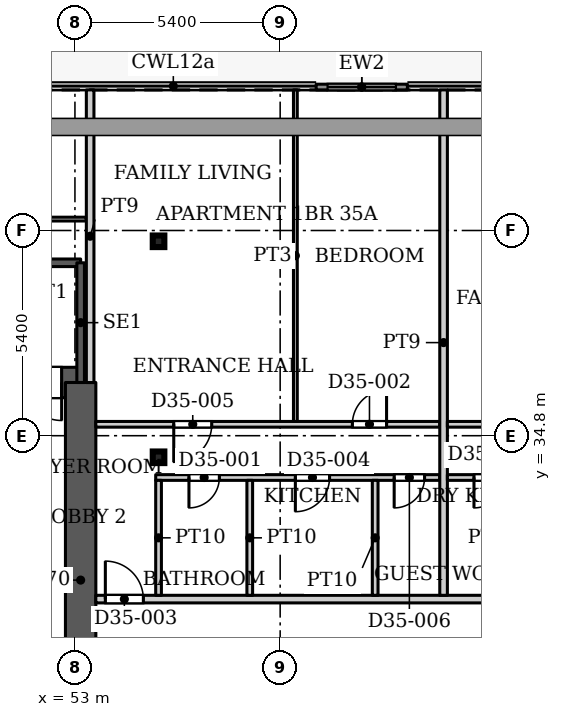
"""IFC4 building model, lengths in metres.
Left out: names, types, materials, properties, quantities, classifications, styles, units other than length and angle.
Written with IfcOpenShell. Run it as: python <this file> out.ifc"""

import sys

from ifc_helpers import new_model, si_unit, direction, frame, frame_2d, origin, origin_2d, place, context, subcontext, project, spatial, rectangle, hollow_rectangle, extrude, source, transform, mapped, element, fill, save


model = new_model("IFC4")
c1 = context("Model", 3, precision=1e-05, world=origin(), true_north=direction((0.0, 1.0)))
c2 = subcontext(c1, "Body", "Model", "MODEL_VIEW")
j1 = project(units=[si_unit("LENGTHUNIT", "METRE"), si_unit("PLANEANGLEUNIT", "RADIAN")], contexts=[c1])
p1 = place(None, origin())
s1 = spatial("IfcSite", under=j1, at=p1, CompositionType="ELEMENT")
p2 = place(p1, origin())
s2 = spatial("IfcBuilding", under=s1, at=p2, CompositionType="ELEMENT")
p3 = place(p2, frame((0.0, 0.0, 152.6)))
s3 = spatial("IfcBuildingStorey", under=s2, at=p3, CompositionType="ELEMENT", Elevation=152.6)
for number, where, z_axis, x_axis in (
    (1, (55.2, 34.232, 0.0), (0.0, 0.0, 1.0), (1.0, 0.0, 0.0)),
    (2, (55.2, 39.916, 0.0), (0.0, 0.0, 1.0), (1.0, 0.0, 0.0)),
):
    element("IfcColumn", number, at=place(p3, frame(where, z_axis=z_axis, x_axis=x_axis)), inside=s3, PredefinedType="COLUMN", context=c2, shape_type="SweptSolid", body=[
        extrude(hollow_rectangle(XDim=0.305, YDim=0.305, WallThickness=0.016, InnerFilletRadius=0.016, OuterFilletRadius=0.032, at=origin_2d()), origin(), (0.0, 0.0, 1.0), 3.9),
    ])
p4 = place(p3, frame((34.75, 36.2, 0.0), z_axis=(0.0, 0.0, 1.0), x_axis=(1.0, 0.0, 0.0)))
e3 = element("IfcWall", 3, at=p4, inside=s3, PredefinedType="SHEAR", context=c2, shape_type="SweptSolid", body=[
    extrude(rectangle(XDim=18.4, YDim=0.8, at=frame_2d((9.2, 0.0))), origin(), (0.0, 0.0, 1.0), 3.9),
])
p5 = place(p4, frame((16.9, 0.0, 0.0)))
e4 = element("IfcOpeningElement", 4, at=p5, cuts=e3, PredefinedType="OPENING", context=c2, shape_type="SweptSolid", body=[
    extrude(rectangle(XDim=1.0, YDim=2.2, at=frame_2d((0.5, 1.1))), frame((0.0, 0.41, 0.0), z_axis=(0.0, -1.0, 0.0), x_axis=(1.0, 0.0, 0.0)), (0.0, 0.0, 1.0), 0.82),
])
p6 = place(p3, frame((53.15, 25.8, 0.0), z_axis=(0.0, 0.0, 1.0), x_axis=(0.0, 1.0, 0.0)))
e5 = element("IfcWall", 5, at=p6, inside=s3, PredefinedType="SHEAR", context=c2, shape_type="SweptSolid", body=[
    extrude(rectangle(XDim=10.4, YDim=0.8, at=frame_2d((5.2, 0.0))), origin(), (0.0, 0.0, 1.0), 3.9),
])
p7 = place(p3, frame((59.347, 43.975, 0.0), z_axis=(0.0, 0.0, 1.0), x_axis=(1.0, 0.0, 0.0)))
e6 = element("IfcWall", 6, at=p7, inside=s3, PredefinedType="SOLIDWALL", context=c2, shape_type="SweptSolid", body=[
    extrude(rectangle(XDim=2.401, YDim=0.15, at=frame_2d((1.201, 0.0))), origin(), (0.0, 0.0, 1.0), 3.75),
])
p8 = place(p7, frame((0.3, 0.0, 0.0)))
e7 = element("IfcOpeningElement", 7, at=p8, cuts=e6, PredefinedType="OPENING", context=c2, shape_type="SweptSolid", body=[
    extrude(rectangle(XDim=1.8, YDim=2.4, at=frame_2d((0.9, 1.2))), frame((0.0, 0.085, 0.0), z_axis=(0.0, -1.0, 0.0), x_axis=(1.0, 0.0, 0.0)), (0.0, 0.0, 1.0), 0.17),
])
p9 = place(p3, frame((43.99, 39.35, 0.0), z_axis=(0.0, 0.0, 1.0), x_axis=(1.0, 0.0, 0.0)))
e8 = element("IfcWall", 8, at=p9, inside=s3, PredefinedType="SHEAR", context=c2, shape_type="SweptSolid", body=[
    extrude(rectangle(XDim=9.16, YDim=0.2, at=frame_2d((4.58, 0.0))), origin(), (0.0, 0.0, 1.0), 3.9),
])
p10 = place(p3, frame((53.15, 36.2, 0.0), z_axis=(0.0, 0.0, 1.0), x_axis=(0.0, 1.0, 0.0)))
e9 = element("IfcWall", 9, at=p10, inside=s3, PredefinedType="SHEAR", context=c2, shape_type="SweptSolid", body=[
    extrude(rectangle(XDim=3.15, YDim=0.2, at=frame_2d((1.575, 0.0))), origin(), (0.0, 0.0, 1.0), 3.9),
])
p11 = place(p3, frame((38.399, 40.5, 0.0), z_axis=(0.0, 0.0, 1.0), x_axis=(1.0, 0.0, 0.0)))
e10 = element("IfcWall", 10, at=p11, inside=s3, PredefinedType="PARTITIONING", context=c2, shape_type="SweptSolid", body=[
    extrude(rectangle(XDim=14.901, YDim=0.1, at=frame_2d((7.451, 0.0))), origin(), (0.0, 0.0, 1.0), 3.6),
])
p12 = place(p11, frame((6.801, 0.0, 0.0)))
e11 = element("IfcOpeningElement", 11, at=p12, cuts=e10, PredefinedType="OPENING", context=c2, shape_type="SweptSolid", body=[
    extrude(rectangle(XDim=1.0, YDim=2.1, at=frame_2d((0.5, 1.05))), frame((0.0, 0.06, 0.0), z_axis=(0.0, -1.0, 0.0), x_axis=(1.0, 0.0, 0.0)), (0.0, 0.0, 1.0), 0.12),
])
p13 = place(p3, frame((53.4, 36.199, 0.0), z_axis=(0.0, 0.0, 1.0), x_axis=(0.0, 1.0, 0.0)))
e12 = element("IfcWall", 12, at=p13, inside=s3, PredefinedType="PARTITIONING", context=c2, shape_type="SweptSolid", body=[
    extrude(rectangle(XDim=7.701, YDim=0.2, at=frame_2d((3.851, 0.0))), origin(), (0.0, 0.0, 1.0), 3.6),
])
p14 = place(p3, frame((53.549, 30.5, 0.0), z_axis=(0.0, 0.0, 1.0), x_axis=(1.0, 0.0, 0.0)))
e13 = element("IfcWall", 13, at=p14, inside=s3, PredefinedType="PARTITIONING", context=c2, shape_type="SweptSolid", body=[
    extrude(rectangle(XDim=35.551, YDim=0.2, at=frame_2d((17.775, 0.0))), origin(), (0.0, 0.0, 1.0), 3.6),
])
p15 = place(p14, frame((0.251, 0.0, 0.0)))
e14 = element("IfcOpeningElement", 14, at=p15, cuts=e13, PredefinedType="OPENING", context=c2, shape_type="SweptSolid", body=[
    extrude(rectangle(XDim=1.0, YDim=2.1, at=frame_2d((0.5, 1.05))), frame((0.0, 0.11, 0.0), z_axis=(0.0, -1.0, 0.0), x_axis=(1.0, 0.0, 0.0)), (0.0, 0.0, 1.0), 0.22),
])
p16 = place(p14, frame((21.701, 0.0, 0.0)))
e15 = element("IfcOpeningElement", 15, at=p16, cuts=e13, PredefinedType="OPENING", context=c2, shape_type="SweptSolid", body=[
    extrude(rectangle(XDim=1.0, YDim=2.1, at=frame_2d((0.5, 1.05))), frame((0.0, 0.11, 0.0), z_axis=(0.0, -1.0, 0.0), x_axis=(1.0, 0.0, 0.0)), (0.0, 0.0, 1.0), 0.22),
])
p17 = place(p14, frame((32.201, 0.0, 0.0)))
e16 = element("IfcOpeningElement", 16, at=p17, cuts=e13, PredefinedType="OPENING", context=c2, shape_type="SweptSolid", body=[
    extrude(rectangle(XDim=1.0, YDim=2.1, at=frame_2d((0.5, 1.05))), frame((0.0, 0.11, 0.0), z_axis=(0.0, -1.0, 0.0), x_axis=(1.0, 0.0, 0.0)), (0.0, 0.0, 1.0), 0.22),
])
p18 = place(p3, frame((53.549, 35.1, 0.0), z_axis=(0.0, 0.0, 1.0), x_axis=(1.0, 0.0, 0.0)))
e17 = element("IfcWall", 17, at=p18, inside=s3, PredefinedType="PARTITIONING", context=c2, shape_type="SweptSolid", body=[
    extrude(rectangle(XDim=9.051, YDim=0.15, at=frame_2d((4.525, 0.0))), origin(), (0.0, 0.0, 1.0), 3.6),
])
p19 = place(p18, frame((6.751, 0.0, 0.0)))
e18 = element("IfcOpeningElement", 18, at=p19, cuts=e17, PredefinedType="OPENING", context=c2, shape_type="SweptSolid", body=[
    extrude(rectangle(XDim=0.9, YDim=2.1, at=frame_2d((0.45, 1.05))), frame((0.0, 0.085, 0.0), z_axis=(0.0, -1.0, 0.0), x_axis=(1.0, 0.0, 0.0)), (0.0, 0.0, 1.0), 0.17),
])
p20 = place(p18, frame((2.051, 0.0, 0.0)))
e19 = element("IfcOpeningElement", 19, at=p20, cuts=e17, PredefinedType="OPENING", context=c2, shape_type="SweptSolid", body=[
    extrude(rectangle(XDim=1.0, YDim=2.1, at=frame_2d((0.5, 1.05))), frame((0.0, 0.085, 0.0), z_axis=(0.0, -1.0, 0.0), x_axis=(1.0, 0.0, 0.0)), (0.0, 0.0, 1.0), 0.17),
])
p21 = place(p3, frame((55.125, 33.7, 0.0), z_axis=(0.0, 0.0, 1.0), x_axis=(1.0, 0.0, 0.0)))
e20 = element("IfcWall", 20, at=p21, inside=s3, PredefinedType="PARTITIONING", context=c2, shape_type="SweptSolid", body=[
    extrude(rectangle(XDim=7.475, YDim=0.15, at=frame_2d((3.738, 0.0))), origin(), (0.0, 0.0, 1.0), 3.6),
])
p22 = place(p21, frame((0.875, 0.0, 0.0)))
e21 = element("IfcOpeningElement", 21, at=p22, cuts=e20, PredefinedType="OPENING", context=c2, shape_type="SweptSolid", body=[
    extrude(rectangle(XDim=0.8, YDim=2.1, at=frame_2d((0.4, 1.05))), frame((0.0, 0.085, 0.0), z_axis=(0.0, -1.0, 0.0), x_axis=(1.0, 0.0, 0.0)), (0.0, 0.0, 1.0), 0.17),
])
p23 = place(p21, frame((3.675, 0.0, 0.0)))
e22 = element("IfcOpeningElement", 22, at=p23, cuts=e20, PredefinedType="OPENING", context=c2, shape_type="SweptSolid", body=[
    extrude(rectangle(XDim=0.9, YDim=2.1, at=frame_2d((0.45, 1.05))), frame((0.0, 0.085, 0.0), z_axis=(0.0, -1.0, 0.0), x_axis=(1.0, 0.0, 0.0)), (0.0, 0.0, 1.0), 0.17),
])
p24 = place(p21, frame((6.275, 0.0, 0.0)))
e23 = element("IfcOpeningElement", 23, at=p24, cuts=e20, PredefinedType="OPENING", context=c2, shape_type="SweptSolid", body=[
    extrude(rectangle(XDim=0.8, YDim=2.1, at=frame_2d((0.4, 1.05))), frame((0.0, 0.085, 0.0), z_axis=(0.0, -1.0, 0.0), x_axis=(1.0, 0.0, 0.0)), (0.0, 0.0, 1.0), 0.17),
])
for number, where, z_axis, x_axis in (
    (24, (55.2, 30.6, 0.0), (0.0, 0.0, 1.0), (0.0, 1.0, 0.0)),
    (25, (57.6, 30.6, 0.0), (0.0, 0.0, 1.0), (0.0, 1.0, 0.0)),
):
    element("IfcWall", number, at=place(p3, frame(where, z_axis=z_axis, x_axis=x_axis)), inside=s3, PredefinedType="PARTITIONING", context=c2, shape_type="SweptSolid", body=[
        extrude(rectangle(XDim=3.025, YDim=0.15, at=frame_2d((1.512, 0.0))), origin(), (0.0, 0.0, 1.0), 3.6),
    ])
p25 = place(p3, frame((58.8, 35.175, 0.0), z_axis=(0.0, 0.0, 1.0), x_axis=(0.0, 1.0, 0.0)))
e26 = element("IfcWall", 26, at=p25, inside=s3, PredefinedType="PARTITIONING", context=c2, shape_type="SweptSolid", body=[
    extrude(rectangle(XDim=8.725, YDim=0.1, at=frame_2d((4.362, 0.0))), origin(), (0.0, 0.0, 1.0), 3.6),
])
p26 = place(p3, frame((60.9, 30.6, 0.0), z_axis=(0.0, 0.0, 1.0), x_axis=(0.0, 1.0, 0.0)))
e27 = element("IfcWall", 27, at=p26, inside=s3, PredefinedType="PARTITIONING", context=c2, shape_type="SweptSolid", body=[
    extrude(rectangle(XDim=3.025, YDim=0.15, at=frame_2d((1.512, 0.0))), origin(), (0.0, 0.0, 1.0), 3.6),
])
p27 = place(p3, frame((62.7, 30.6, 0.0), z_axis=(0.0, 0.0, 1.0), x_axis=(0.0, 1.0, 0.0)))
e28 = element("IfcWall", 28, at=p27, inside=s3, PredefinedType="PARTITIONING", context=c2, shape_type="SweptSolid", body=[
    extrude(rectangle(XDim=13.3, YDim=0.2, at=frame_2d((6.65, 0.0))), origin(), (0.0, 0.0, 1.0), 3.6),
])
p28 = place(p3, frame((62.8, 33.7, 0.0), z_axis=(0.0, 0.0, 1.0), x_axis=(1.0, 0.0, 0.0)))
e29 = element("IfcWall", 29, at=p28, inside=s3, PredefinedType="PARTITIONING", context=c2, shape_type="SweptSolid", body=[
    extrude(rectangle(XDim=11.975, YDim=0.15, at=frame_2d((5.987, 0.0))), origin(), (0.0, 0.0, 1.0), 3.6),
])
p29 = place(p28, frame((10.3, 0.0, 0.0)))
e30 = element("IfcOpeningElement", 30, at=p29, cuts=e29, PredefinedType="OPENING", context=c2, shape_type="SweptSolid", body=[
    extrude(rectangle(XDim=0.8, YDim=2.1, at=frame_2d((0.4, 1.05))), frame((0.0, 0.085, 0.0), z_axis=(0.0, -1.0, 0.0), x_axis=(1.0, 0.0, 0.0)), (0.0, 0.0, 1.0), 0.17),
])
p30 = place(p28, frame((0.7, 0.0, 0.0)))
e31 = element("IfcOpeningElement", 31, at=p30, cuts=e29, PredefinedType="OPENING", context=c2, shape_type="SweptSolid", body=[
    extrude(rectangle(XDim=0.8, YDim=2.1, at=frame_2d((0.4, 1.05))), frame((0.0, 0.085, 0.0), z_axis=(0.0, -1.0, 0.0), x_axis=(1.0, 0.0, 0.0)), (0.0, 0.0, 1.0), 0.17),
])
p31 = place(p28, frame((5.3, 0.0, 0.0)))
e32 = element("IfcOpeningElement", 32, at=p31, cuts=e29, PredefinedType="OPENING", context=c2, shape_type="SweptSolid", body=[
    extrude(rectangle(XDim=0.9, YDim=2.1, at=frame_2d((0.45, 1.05))), frame((0.0, 0.085, 0.0), z_axis=(0.0, -1.0, 0.0), x_axis=(1.0, 0.0, 0.0)), (0.0, 0.0, 1.0), 0.17),
])
p32 = place(p28, frame((8.05, 0.0, 0.0)))
e33 = element("IfcOpeningElement", 33, at=p32, cuts=e29, PredefinedType="OPENING", context=c2, shape_type="SweptSolid", body=[
    extrude(rectangle(XDim=0.8, YDim=2.1, at=frame_2d((0.4, 1.05))), frame((0.0, 0.085, 0.0), z_axis=(0.0, -1.0, 0.0), x_axis=(1.0, 0.0, 0.0)), (0.0, 0.0, 1.0), 0.17),
])
p33 = place(p28, frame((2.8, 0.0, 0.0)))
e34 = element("IfcOpeningElement", 34, at=p33, cuts=e29, PredefinedType="OPENING", context=c2, shape_type="SweptSolid", body=[
    extrude(rectangle(XDim=0.8, YDim=2.1, at=frame_2d((0.4, 1.05))), frame((0.0, 0.085, 0.0), z_axis=(0.0, -1.0, 0.0), x_axis=(1.0, 0.0, 0.0)), (0.0, 0.0, 1.0), 0.17),
])
p34 = place(p3, frame((62.8, 35.1, 0.0), z_axis=(0.0, 0.0, 1.0), x_axis=(1.0, 0.0, 0.0)))
e35 = element("IfcWall", 35, at=p34, inside=s3, PredefinedType="PARTITIONING", context=c2, shape_type="SweptSolid", body=[
    extrude(rectangle(XDim=13.9, YDim=0.15, at=frame_2d((6.95, 0.0))), origin(), (0.0, 0.0, 1.0), 3.6),
])
p35 = place(p34, frame((11.6, 0.0, 0.0)))
e36 = element("IfcOpeningElement", 36, at=p35, cuts=e35, PredefinedType="OPENING", context=c2, shape_type="SweptSolid", body=[
    extrude(rectangle(XDim=0.9, YDim=2.1, at=frame_2d((0.45, 1.05))), frame((0.0, 0.085, 0.0), z_axis=(0.0, -1.0, 0.0), x_axis=(1.0, 0.0, 0.0)), (0.0, 0.0, 1.0), 0.17),
])
p36 = place(p34, frame((1.8, 0.0, 0.0)))
e37 = element("IfcOpeningElement", 37, at=p36, cuts=e35, PredefinedType="OPENING", context=c2, shape_type="SweptSolid", body=[
    extrude(rectangle(XDim=1.0, YDim=2.1, at=frame_2d((0.5, 1.05))), frame((0.0, 0.085, 0.0), z_axis=(0.0, -1.0, 0.0), x_axis=(1.0, 0.0, 0.0)), (0.0, 0.0, 1.0), 0.17),
])
p37 = place(p34, frame((5.5, 0.0, 0.0)))
e38 = element("IfcOpeningElement", 38, at=p37, cuts=e35, PredefinedType="OPENING", context=c2, shape_type="SweptSolid", body=[
    extrude(rectangle(XDim=0.9, YDim=2.1, at=frame_2d((0.45, 1.05))), frame((0.0, 0.085, 0.0), z_axis=(0.0, -1.0, 0.0), x_axis=(1.0, 0.0, 0.0)), (0.0, 0.0, 1.0), 0.17),
])
m1 = source(origin(), c2, "Body", "SweptSolid", [
    extrude(rectangle(XDim=1.8, YDim=2.4, at=frame_2d((0.9, 1.2))), frame((0.0, 0.025, 0.0), z_axis=(0.0, -1.0, 0.0), x_axis=(1.0, 0.0, 0.0)), (0.0, 0.0, 1.0), 0.05),
])
p38 = place(p8, origin())
e39 = element("IfcDoor", 39, at=p38, inside=s3, OperationType="SLIDING_TO_LEFT", PredefinedType="DOOR", context=c2, shape_type="MappedRepresentation", body=[
    mapped(m1, transform((0.0, 0.0, 0.0), x_axis=(1.0, 0.0, 0.0), y_axis=(0.0, 1.0, 0.0), z_axis=(0.0, 0.0, 1.0), scale=1.0)),
])
fill(e7, e39)
m2 = source(origin(), c2, "Body", "SweptSolid", [
    extrude(rectangle(XDim=1.0, YDim=2.2, at=frame_2d((0.5, 1.1))), frame((0.0, 0.025, 0.0), z_axis=(0.0, -1.0, 0.0), x_axis=(1.0, 0.0, 0.0)), (0.0, 0.0, 1.0), 0.05),
])
p39 = place(p5, origin())
e40 = element("IfcDoor", 40, at=p39, inside=s3, OperationType="SINGLE_SWING_RIGHT", PredefinedType="DOOR", context=c2, shape_type="MappedRepresentation", body=[
    mapped(m2, transform((0.0, 0.0, 0.0), x_axis=(1.0, 0.0, 0.0), y_axis=(0.0, 1.0, 0.0), z_axis=(0.0, 0.0, 1.0), scale=1.0)),
])
fill(e4, e40)
m3 = source(origin(), c2, "Body", "SweptSolid", [
    extrude(rectangle(XDim=0.8, YDim=2.1, at=frame_2d((0.4, 1.05))), frame((0.0, 0.025, 0.0), z_axis=(0.0, -1.0, 0.0), x_axis=(1.0, 0.0, 0.0)), (0.0, 0.0, 1.0), 0.05),
])
p40 = place(p22, origin())
e41 = element("IfcDoor", 41, at=p40, inside=s3, OperationType="SINGLE_SWING_RIGHT", PredefinedType="DOOR", context=c2, shape_type="MappedRepresentation", body=[
    mapped(m3, transform((0.0, 0.0, 0.0), x_axis=(1.0, 0.0, 0.0), y_axis=(0.0, 1.0, 0.0), z_axis=(0.0, 0.0, 1.0), scale=1.0)),
])
fill(e21, e41)
m4 = source(origin(), c2, "Body", "SweptSolid", [
    extrude(rectangle(XDim=0.9, YDim=2.1, at=frame_2d((0.45, 1.05))), frame((0.0, 0.025, 0.0), z_axis=(0.0, -1.0, 0.0), x_axis=(1.0, 0.0, 0.0)), (0.0, 0.0, 1.0), 0.05),
])
p41 = place(p19, origin())
e42 = element("IfcDoor", 42, at=p41, inside=s3, OperationType="SINGLE_SWING_LEFT", PredefinedType="DOOR", context=c2, shape_type="MappedRepresentation", body=[
    mapped(m4, transform((0.0, 0.0, 0.0), x_axis=(1.0, 0.0, 0.0), y_axis=(0.0, 1.0, 0.0), z_axis=(0.0, 0.0, 1.0), scale=1.0)),
])
fill(e18, e42)
m5 = source(origin(), c2, "Body", "SweptSolid", [
    extrude(rectangle(XDim=1.0, YDim=2.1, at=frame_2d((0.5, 1.05))), frame((0.0, 0.025, 0.0), z_axis=(0.0, -1.0, 0.0), x_axis=(1.0, 0.0, 0.0)), (0.0, 0.0, 1.0), 0.05),
])
p42 = place(p15, origin())
e43 = element("IfcDoor", 43, at=p42, inside=s3, OperationType="SINGLE_SWING_LEFT", PredefinedType="DOOR", context=c2, shape_type="MappedRepresentation", body=[
    mapped(m5, transform((0.0, 0.0, 0.0), x_axis=(1.0, 0.0, 0.0), y_axis=(0.0, 1.0, 0.0), z_axis=(0.0, 0.0, 1.0), scale=1.0)),
])
fill(e14, e43)
p43 = place(p23, origin())
e44 = element("IfcDoor", 44, at=p43, inside=s3, OperationType="SINGLE_SWING_RIGHT", PredefinedType="DOOR", context=c2, shape_type="MappedRepresentation", body=[
    mapped(m4, transform((0.0, 0.0, 0.0), x_axis=(1.0, 0.0, 0.0), y_axis=(0.0, 1.0, 0.0), z_axis=(0.0, 0.0, 1.0), scale=1.0)),
])
fill(e22, e44)
m6 = source(origin(), c2, "Body", "SweptSolid", [
    extrude(rectangle(XDim=1.0, YDim=2.1, at=frame_2d((0.5, 1.05))), frame((0.0, 0.025, 0.0), z_axis=(0.0, -1.0, 0.0), x_axis=(1.0, 0.0, 0.0)), (0.0, 0.0, 1.0), 0.05),
])
p44 = place(p20, origin())
e45 = element("IfcDoor", 45, at=p44, inside=s3, OperationType="SINGLE_SWING_RIGHT", PredefinedType="DOOR", context=c2, shape_type="MappedRepresentation", body=[
    mapped(m6, transform((0.0, 0.0, 0.0), x_axis=(1.0, 0.0, 0.0), y_axis=(0.0, 1.0, 0.0), z_axis=(0.0, 0.0, 1.0), scale=1.0)),
])
fill(e19, e45)
p45 = place(p24, origin())
e46 = element("IfcDoor", 46, at=p45, inside=s3, OperationType="SINGLE_SWING_RIGHT", PredefinedType="DOOR", context=c2, shape_type="MappedRepresentation", body=[
    mapped(m3, transform((0.0, 0.0, 0.0), x_axis=(1.0, 0.0, 0.0), y_axis=(0.0, 1.0, 0.0), z_axis=(0.0, 0.0, 1.0), scale=1.0)),
])
fill(e23, e46)
p46 = place(p30, origin())
e47 = element("IfcDoor", 47, at=p46, inside=s3, OperationType="SINGLE_SWING_RIGHT", PredefinedType="DOOR", context=c2, shape_type="MappedRepresentation", body=[
    mapped(m3, transform((0.0, 0.0, 0.0), x_axis=(1.0, 0.0, 0.0), y_axis=(0.0, 1.0, 0.0), z_axis=(0.0, 0.0, 1.0), scale=1.0)),
])
fill(e31, e47)
save(model, sys.argv[1])
